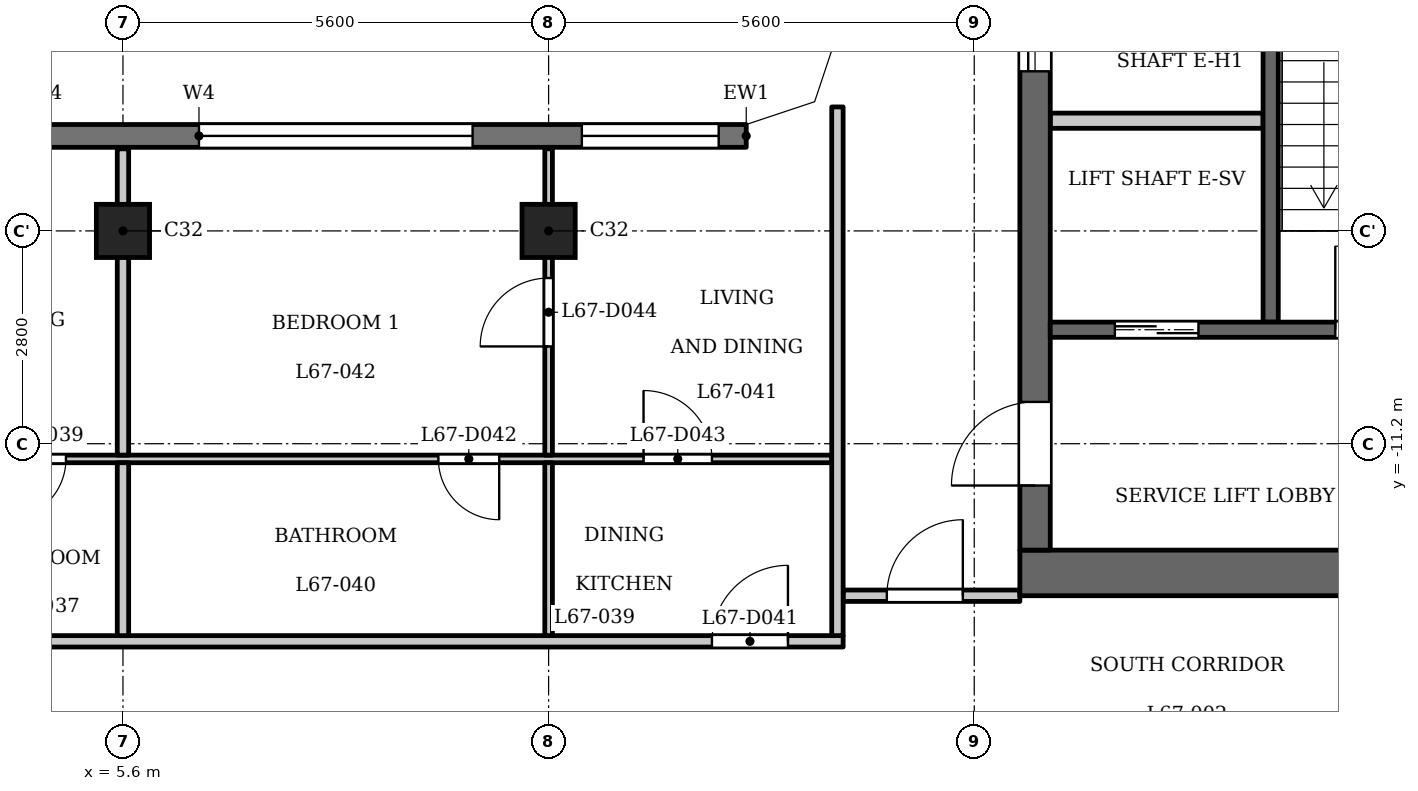
"""IFC4 building model, lengths in metres.
Left out: names, types, materials, properties, quantities, classifications, styles, units other than length and angle.
Written with IfcOpenShell. Run it as: python <this file> out.ifc"""

import sys

from ifc_helpers import new_model, si_unit, direction, frame, frame_2d, origin, origin_2d, place, context, subcontext, project, spatial, polyline, rectangle, outline, extrude, element, fill, save


model = new_model("IFC4")
c1 = context("Model", 3, precision=1e-05, world=origin(), true_north=direction((0.0, 1.0)))
c2 = subcontext(c1, "Body", "Model", "MODEL_VIEW")
j1 = project(units=[si_unit("LENGTHUNIT", "METRE"), si_unit("PLANEANGLEUNIT", "RADIAN")], contexts=[c1])
p1 = place(None, origin())
s1 = spatial("IfcSite", under=j1, at=p1, CompositionType="ELEMENT")
p2 = place(p1, origin())
s2 = spatial("IfcBuilding", under=s1, at=p2, CompositionType="ELEMENT")
p3 = place(p2, frame((0.0, 0.0, 259.2)))
s3 = spatial("IfcBuildingStorey", under=s2, at=p3, CompositionType="ELEMENT", Elevation=259.2)
for number, where, z_axis, x_axis in (
    (1, (5.6, -8.4, 0.0), (0.0, 0.0, 1.0), (1.0, 0.0, 0.0)),
    (2, (11.2, -8.4, 0.0), (0.0, 0.0, 1.0), (1.0, 0.0, 0.0)),
):
    element("IfcColumn", number, at=place(p3, frame(where, z_axis=z_axis, x_axis=x_axis)), inside=s3, PredefinedType="COLUMN", context=c2, shape_type="SweptSolid", body=[
        extrude(rectangle(XDim=0.7, YDim=0.7, at=origin_2d()), origin(), (0.0, 0.0, 1.0), 3.5),
    ])
p4 = place(p3, frame((13.8, -7.15, 0.0), z_axis=(0.0, 0.0, 1.0), x_axis=(-1.0, 0.0, 0.0)))
e3 = element("IfcWall", 3, at=p4, inside=s3, PredefinedType="SOLIDWALL", context=c2, shape_type="SweptSolid", body=[
    extrude(rectangle(XDim=27.6, YDim=0.3, at=frame_2d((13.8, 0.0))), origin(), (0.0, 0.0, 1.0), 3.2),
])
p5 = place(p4, frame((0.363, 0.0, 0.9)))
e4 = element("IfcOpeningElement", 4, at=p5, cuts=e3, PredefinedType="OPENING", context=c2, shape_type="SweptSolid", body=[
    extrude(rectangle(XDim=1.8, YDim=1.25, at=frame_2d((0.9, 0.625))), frame((0.0, 0.16, 0.0), z_axis=(0.0, -1.0, 0.0), x_axis=(1.0, 0.0, 0.0)), (0.0, 0.0, 1.0), 0.32),
])
p6 = place(p4, frame((3.6, 0.0, 1.2)))
e5 = element("IfcOpeningElement", 5, at=p6, cuts=e3, PredefinedType="OPENING", context=c2, shape_type="SweptSolid", body=[
    extrude(rectangle(XDim=3.6, YDim=0.95, at=frame_2d((1.8, 0.475))), frame((0.0, 0.16, 0.0), z_axis=(0.0, -1.0, 0.0), x_axis=(1.0, 0.0, 0.0)), (0.0, 0.0, 1.0), 0.32),
])
p7 = place(p4, frame((9.2, 0.0, 1.2)))
e6 = element("IfcOpeningElement", 6, at=p7, cuts=e3, PredefinedType="OPENING", context=c2, shape_type="SweptSolid", body=[
    extrude(rectangle(XDim=3.6, YDim=0.95, at=frame_2d((1.8, 0.475))), frame((0.0, 0.16, 0.0), z_axis=(0.0, -1.0, 0.0), x_axis=(1.0, 0.0, 0.0)), (0.0, 0.0, 1.0), 0.32),
])
p8 = place(p4, frame((14.8, 0.0, 1.2)))
e7 = element("IfcOpeningElement", 7, at=p8, cuts=e3, PredefinedType="OPENING", context=c2, shape_type="SweptSolid", body=[
    extrude(rectangle(XDim=3.6, YDim=0.95, at=frame_2d((1.8, 0.475))), frame((0.0, 0.16, 0.0), z_axis=(0.0, -1.0, 0.0), x_axis=(1.0, 0.0, 0.0)), (0.0, 0.0, 1.0), 0.32),
])
p9 = place(p4, frame((20.4, 0.0, 1.2)))
e8 = element("IfcOpeningElement", 8, at=p9, cuts=e3, PredefinedType="OPENING", context=c2, shape_type="SweptSolid", body=[
    extrude(rectangle(XDim=3.6, YDim=0.95, at=frame_2d((1.8, 0.475))), frame((0.0, 0.16, 0.0), z_axis=(0.0, -1.0, 0.0), x_axis=(1.0, 0.0, 0.0)), (0.0, 0.0, 1.0), 0.32),
])
p10 = place(p4, frame((25.438, 0.0, 0.9)))
e9 = element("IfcOpeningElement", 9, at=p10, cuts=e3, PredefinedType="OPENING", context=c2, shape_type="SweptSolid", body=[
    extrude(rectangle(XDim=1.8, YDim=1.25, at=frame_2d((0.9, 0.625))), frame((0.0, 0.16, 0.0), z_axis=(0.0, -1.0, 0.0), x_axis=(1.0, 0.0, 0.0)), (0.0, 0.0, 1.0), 0.32),
])
p11 = place(p3, frame((20.7, -9.6, 0.0), z_axis=(0.0, 0.0, 1.0), x_axis=(0.0, 1.0, 0.0)))
e10 = element("IfcWall", 10, at=p11, inside=s3, PredefinedType="SHEAR", context=c2, shape_type="SweptSolid", body=[
    extrude(rectangle(XDim=7.35, YDim=0.2, at=frame_2d((3.675, 0.0))), origin(), (0.0, 0.0, 1.0), 3.2),
])
p12 = place(p3, frame((17.4, -12.9, 0.0), z_axis=(0.0, 0.0, 1.0), x_axis=(1.0, 0.0, 0.0)))
e11 = element("IfcWall", 11, at=p12, inside=s3, PredefinedType="SHEAR", context=c2, shape_type="SweptSolid", body=[
    extrude(rectangle(XDim=7.32, YDim=0.6, at=frame_2d((3.66, 0.0))), origin(), (0.0, 0.0, 1.0), 3.2),
])
p13 = place(p3, frame((17.6, -12.6, 0.0), z_axis=(0.0, 0.0, 1.0), x_axis=(0.0, 1.0, 0.0)))
e12 = element("IfcWall", 12, at=p13, inside=s3, PredefinedType="SHEAR", context=c2, shape_type="SweptSolid", body=[
    extrude(rectangle(XDim=25.2, YDim=0.4, at=frame_2d((12.6, 0.0))), origin(), (0.0, 0.0, 1.0), 3.2),
])
p14 = place(p13, frame((6.3, 0.0, 0.0)))
e13 = element("IfcOpeningElement", 13, at=p14, cuts=e12, PredefinedType="OPENING", context=c2, shape_type="SweptSolid", body=[
    extrude(rectangle(XDim=1.1, YDim=2.1, at=frame_2d((0.55, 1.05))), frame((0.0, 0.21, 0.0), z_axis=(0.0, -1.0, 0.0), x_axis=(1.0, 0.0, 0.0)), (0.0, 0.0, 1.0), 0.42),
])
p15 = place(p13, frame((8.7, 0.0, 0.0)))
e14 = element("IfcOpeningElement", 14, at=p15, cuts=e12, PredefinedType="OPENING", context=c2, shape_type="SweptSolid", body=[
    extrude(rectangle(XDim=1.1, YDim=2.1, at=frame_2d((0.55, 1.05))), frame((0.0, 0.21, 0.0), z_axis=(0.0, -1.0, 0.0), x_axis=(1.0, 0.0, 0.0)), (0.0, 0.0, 1.0), 0.42),
])
p16 = place(p13, frame((11.2, 0.0, 0.0)))
e15 = element("IfcOpeningElement", 15, at=p16, cuts=e12, PredefinedType="OPENING", context=c2, shape_type="SweptSolid", body=[
    extrude(rectangle(XDim=0.9, YDim=2.1, at=frame_2d((0.45, 1.05))), frame((0.0, 0.21, 0.0), z_axis=(0.0, -1.0, 0.0), x_axis=(1.0, 0.0, 0.0)), (0.0, 0.0, 1.0), 0.42),
])
p17 = place(p13, frame((17.05, 0.0, 0.0)))
e16 = element("IfcOpeningElement", 16, at=p17, cuts=e12, PredefinedType="OPENING", context=c2, shape_type="SweptSolid", body=[
    extrude(rectangle(XDim=0.9, YDim=2.1, at=frame_2d((0.45, 1.05))), frame((0.0, 0.21, 0.0), z_axis=(0.0, -1.0, 0.0), x_axis=(1.0, 0.0, 0.0)), (0.0, 0.0, 1.0), 0.42),
])
p18 = place(p13, frame((23.25, 0.0, 0.0)))
e17 = element("IfcOpeningElement", 17, at=p18, cuts=e12, PredefinedType="OPENING", context=c2, shape_type="SweptSolid", body=[
    extrude(rectangle(XDim=1.1, YDim=2.1, at=frame_2d((0.55, 1.05))), frame((0.0, 0.21, 0.0), z_axis=(0.0, -1.0, 0.0), x_axis=(1.0, 0.0, 0.0)), (0.0, 0.0, 1.0), 0.42),
])
p19 = place(p13, frame((0.85, 0.0, 0.0)))
e18 = element("IfcOpeningElement", 18, at=p19, cuts=e12, PredefinedType="OPENING", context=c2, shape_type="SweptSolid", body=[
    extrude(rectangle(XDim=1.1, YDim=2.1, at=frame_2d((0.55, 1.05))), frame((0.0, 0.21, 0.0), z_axis=(0.0, -1.0, 0.0), x_axis=(1.0, 0.0, 0.0)), (0.0, 0.0, 1.0), 0.42),
])
p20 = place(p13, frame((13.075, 0.0, 0.0)))
e19 = element("IfcOpeningElement", 19, at=p20, cuts=e12, PredefinedType="OPENING", context=c2, shape_type="SweptSolid", body=[
    extrude(rectangle(XDim=1.8, YDim=2.1, at=frame_2d((0.9, 1.05))), frame((0.0, 0.21, 0.0), z_axis=(0.0, -1.0, 0.0), x_axis=(1.0, 0.0, 0.0)), (0.0, 0.0, 1.0), 0.42),
])
p21 = place(p3, frame((17.8, -9.7, 0.0), z_axis=(0.0, 0.0, 1.0), x_axis=(1.0, 0.0, 0.0)))
e20 = element("IfcWall", 20, at=p21, inside=s3, PredefinedType="SHEAR", context=c2, shape_type="SweptSolid", body=[
    extrude(rectangle(XDim=5.8, YDim=0.2, at=frame_2d((2.9, 0.0))), origin(), (0.0, 0.0, 1.0), 3.2),
])
p22 = place(p21, frame((0.85, 0.0, 0.0)))
e21 = element("IfcOpeningElement", 21, at=p22, cuts=e20, PredefinedType="OPENING", context=c2, shape_type="SweptSolid", body=[
    extrude(rectangle(XDim=1.1, YDim=2.1, at=frame_2d((0.55, 1.05))), frame((0.0, 0.11, 0.0), z_axis=(0.0, -1.0, 0.0), x_axis=(1.0, 0.0, 0.0)), (0.0, 0.0, 1.0), 0.22),
])
p23 = place(p21, frame((3.75, 0.0, 0.0)))
e22 = element("IfcOpeningElement", 22, at=p23, cuts=e20, PredefinedType="OPENING", context=c2, shape_type="SweptSolid", body=[
    extrude(rectangle(XDim=1.1, YDim=2.1, at=frame_2d((0.55, 1.05))), frame((0.0, 0.11, 0.0), z_axis=(0.0, -1.0, 0.0), x_axis=(1.0, 0.0, 0.0)), (0.0, 0.0, 1.0), 0.22),
])
p24 = place(p3, frame((17.8, -6.95, 0.0), z_axis=(0.0, 0.0, 1.0), x_axis=(1.0, 0.0, 0.0)))
e23 = element("IfcWall", 23, at=p24, inside=s3, PredefinedType="PARTITIONING", context=c2, shape_type="SweptSolid", body=[
    extrude(rectangle(XDim=2.8, YDim=0.2, at=frame_2d((1.4, 0.0))), origin(), (0.0, 0.0, 1.0), 3.2),
])
p25 = place(p3, frame((-15.075, -13.8, 0.0), z_axis=(0.0, 0.0, 1.0), x_axis=(1.0, 0.0, 0.0)))
e24 = element("IfcWall", 24, at=p25, inside=s3, PredefinedType="PARTITIONING", context=c2, shape_type="SweptSolid", body=[
    extrude(rectangle(XDim=30.15, YDim=0.15, at=frame_2d((15.075, 0.0))), origin(), (0.0, 0.0, 1.0), 3.2),
])
p26 = place(p25, frame((7.825, 0.0, 0.0)))
e25 = element("IfcOpeningElement", 25, at=p26, cuts=e24, PredefinedType="OPENING", context=c2, shape_type="SweptSolid", body=[
    extrude(rectangle(XDim=1.0, YDim=2.1, at=frame_2d((0.5, 1.05))), frame((0.0, 0.085, 0.0), z_axis=(0.0, -1.0, 0.0), x_axis=(1.0, 0.0, 0.0)), (0.0, 0.0, 1.0), 0.17),
])
p27 = place(p25, frame((11.225, 0.0, 0.0)))
e26 = element("IfcOpeningElement", 26, at=p27, cuts=e24, PredefinedType="OPENING", context=c2, shape_type="SweptSolid", body=[
    extrude(rectangle(XDim=1.0, YDim=2.1, at=frame_2d((0.5, 1.05))), frame((0.0, 0.085, 0.0), z_axis=(0.0, -1.0, 0.0), x_axis=(1.0, 0.0, 0.0)), (0.0, 0.0, 1.0), 0.17),
])
p28 = place(p25, frame((15.575, 0.0, 0.0)))
e27 = element("IfcOpeningElement", 27, at=p28, cuts=e24, PredefinedType="OPENING", context=c2, shape_type="SweptSolid", body=[
    extrude(rectangle(XDim=1.0, YDim=2.1, at=frame_2d((0.5, 1.05))), frame((0.0, 0.085, 0.0), z_axis=(0.0, -1.0, 0.0), x_axis=(1.0, 0.0, 0.0)), (0.0, 0.0, 1.0), 0.17),
])
p29 = place(p25, frame((28.424, 0.0, 0.0)))
e28 = element("IfcOpeningElement", 28, at=p29, cuts=e24, PredefinedType="OPENING", context=c2, shape_type="SweptSolid", body=[
    extrude(rectangle(XDim=1.0, YDim=2.1, at=frame_2d((0.5, 1.05))), frame((0.0, 0.085, 0.0), z_axis=(0.0, -1.0, 0.0), x_axis=(1.0, 0.0, 0.0)), (0.0, 0.0, 1.0), 0.17),
])
p30 = place(p3, frame((15.075, -13.2, 0.0), z_axis=(0.0, 0.0, 1.0), x_axis=(1.0, 0.0, 0.0)))
e29 = element("IfcWall", 29, at=p30, inside=s3, PredefinedType="PARTITIONING", context=c2, shape_type="SweptSolid", body=[
    extrude(rectangle(XDim=2.325, YDim=0.15, at=frame_2d((1.163, 0.0))), origin(), (0.0, 0.0, 1.0), 3.2),
])
p31 = place(p30, frame((0.575, 0.0, 0.0)))
e30 = element("IfcOpeningElement", 30, at=p31, cuts=e29, PredefinedType="OPENING", context=c2, shape_type="SweptSolid", body=[
    extrude(rectangle(XDim=1.0, YDim=2.1, at=frame_2d((0.5, 1.05))), frame((0.0, 0.085, 0.0), z_axis=(0.0, -1.0, 0.0), x_axis=(1.0, 0.0, 0.0)), (0.0, 0.0, 1.0), 0.17),
])
p32 = place(p3, frame((-14.925, -11.4, 0.0), z_axis=(0.0, 0.0, 1.0), x_axis=(1.0, 0.0, 0.0)))
e31 = element("IfcWall", 31, at=p32, inside=s3, PredefinedType="PARTITIONING", context=c2, shape_type="SweptSolid", body=[
    extrude(rectangle(XDim=29.85, YDim=0.1, at=frame_2d((14.925, 0.0))), origin(), (0.0, 0.0, 1.0), 3.2),
])
p33 = place(p32, frame((2.326, 0.0, 0.0)))
e32 = element("IfcOpeningElement", 32, at=p33, cuts=e31, PredefinedType="OPENING", context=c2, shape_type="SweptSolid", body=[
    extrude(rectangle(XDim=0.8, YDim=2.1, at=frame_2d((0.4, 1.05))), frame((0.0, 0.06, 0.0), z_axis=(0.0, -1.0, 0.0), x_axis=(1.0, 0.0, 0.0)), (0.0, 0.0, 1.0), 0.12),
])
p34 = place(p32, frame((6.775, 0.0, 0.0)))
e33 = element("IfcOpeningElement", 33, at=p34, cuts=e31, PredefinedType="OPENING", context=c2, shape_type="SweptSolid", body=[
    extrude(rectangle(XDim=0.9, YDim=2.1, at=frame_2d((0.45, 1.05))), frame((0.0, 0.06, 0.0), z_axis=(0.0, -1.0, 0.0), x_axis=(1.0, 0.0, 0.0)), (0.0, 0.0, 1.0), 0.12),
])
p35 = place(p32, frame((13.375, 0.0, 0.0)))
e34 = element("IfcOpeningElement", 34, at=p35, cuts=e31, PredefinedType="OPENING", context=c2, shape_type="SweptSolid", body=[
    extrude(rectangle(XDim=0.8, YDim=2.1, at=frame_2d((0.4, 1.05))), frame((0.0, 0.06, 0.0), z_axis=(0.0, -1.0, 0.0), x_axis=(1.0, 0.0, 0.0)), (0.0, 0.0, 1.0), 0.12),
])
p36 = place(p32, frame((10.175, 0.0, 0.0)))
e35 = element("IfcOpeningElement", 35, at=p36, cuts=e31, PredefinedType="OPENING", context=c2, shape_type="SweptSolid", body=[
    extrude(rectangle(XDim=0.9, YDim=2.1, at=frame_2d((0.45, 1.05))), frame((0.0, 0.06, 0.0), z_axis=(0.0, -1.0, 0.0), x_axis=(1.0, 0.0, 0.0)), (0.0, 0.0, 1.0), 0.12),
])
p37 = place(p32, frame((18.975, 0.0, 0.0)))
e36 = element("IfcOpeningElement", 36, at=p37, cuts=e31, PredefinedType="OPENING", context=c2, shape_type="SweptSolid", body=[
    extrude(rectangle(XDim=0.8, YDim=2.1, at=frame_2d((0.4, 1.05))), frame((0.0, 0.06, 0.0), z_axis=(0.0, -1.0, 0.0), x_axis=(1.0, 0.0, 0.0)), (0.0, 0.0, 1.0), 0.12),
])
p38 = place(p32, frame((16.525, 0.0, 0.0)))
e37 = element("IfcOpeningElement", 37, at=p38, cuts=e31, PredefinedType="OPENING", context=c2, shape_type="SweptSolid", body=[
    extrude(rectangle(XDim=0.9, YDim=2.1, at=frame_2d((0.45, 1.05))), frame((0.0, 0.06, 0.0), z_axis=(0.0, -1.0, 0.0), x_axis=(1.0, 0.0, 0.0)), (0.0, 0.0, 1.0), 0.12),
])
p39 = place(p32, frame((24.675, 0.0, 0.0)))
e38 = element("IfcOpeningElement", 38, at=p39, cuts=e31, PredefinedType="OPENING", context=c2, shape_type="SweptSolid", body=[
    extrude(rectangle(XDim=0.8, YDim=2.1, at=frame_2d((0.4, 1.05))), frame((0.0, 0.06, 0.0), z_axis=(0.0, -1.0, 0.0), x_axis=(1.0, 0.0, 0.0)), (0.0, 0.0, 1.0), 0.12),
])
p40 = place(p32, frame((27.374, 0.0, 0.0)))
e39 = element("IfcOpeningElement", 39, at=p40, cuts=e31, PredefinedType="OPENING", context=c2, shape_type="SweptSolid", body=[
    extrude(rectangle(XDim=0.9, YDim=2.1, at=frame_2d((0.45, 1.05))), frame((0.0, 0.06, 0.0), z_axis=(0.0, -1.0, 0.0), x_axis=(1.0, 0.0, 0.0)), (0.0, 0.0, 1.0), 0.12),
])
p41 = place(p3, frame((5.6, -13.725, 0.0), z_axis=(0.0, 0.0, 1.0), x_axis=(0.0, 1.0, 0.0)))
e40 = element("IfcWall", 40, at=p41, inside=s3, PredefinedType="PARTITIONING", context=c2, shape_type="SweptSolid", body=[
    extrude(rectangle(XDim=2.275, YDim=0.15, at=frame_2d((1.138, 0.0))), origin(), (0.0, 0.0, 1.0), 3.2),
])
p42 = place(p3, frame((5.6, -11.35, 0.0), z_axis=(0.0, 0.0, 1.0), x_axis=(0.0, 1.0, 0.0)))
e41 = element("IfcWall", 41, at=p42, inside=s3, PredefinedType="PARTITIONING", context=c2, shape_type="SweptSolid", body=[
    extrude(rectangle(XDim=4.03, YDim=0.15, at=frame_2d((2.015, 0.0))), origin(), (0.0, 0.0, 1.0), 3.2),
])
p43 = place(p3, frame((11.2, -13.725, 0.0), z_axis=(0.0, 0.0, 1.0), x_axis=(0.0, 1.0, 0.0)))
e42 = element("IfcWall", 42, at=p43, inside=s3, PredefinedType="PARTITIONING", context=c2, shape_type="SweptSolid", body=[
    extrude(rectangle(XDim=2.275, YDim=0.1, at=frame_2d((1.138, 0.0))), origin(), (0.0, 0.0, 1.0), 3.2),
])
p44 = place(p3, frame((11.2, -11.35, 0.0), z_axis=(0.0, 0.0, 1.0), x_axis=(0.0, 1.0, 0.0)))
e43 = element("IfcWall", 43, at=p44, inside=s3, PredefinedType="PARTITIONING", context=c2, shape_type="SweptSolid", body=[
    extrude(rectangle(XDim=4.03, YDim=0.1, at=frame_2d((2.015, 0.0))), origin(), (0.0, 0.0, 1.0), 3.2),
])
p45 = place(p44, frame((1.43, 0.0, 0.0)))
e44 = element("IfcOpeningElement", 44, at=p45, cuts=e43, PredefinedType="OPENING", context=c2, shape_type="SweptSolid", body=[
    extrude(rectangle(XDim=0.9, YDim=2.1, at=frame_2d((0.45, 1.05))), frame((0.0, 0.06, 0.0), z_axis=(0.0, -1.0, 0.0), x_axis=(1.0, 0.0, 0.0)), (0.0, 0.0, 1.0), 0.12),
])
p46 = place(p3, frame((15.0, -13.725, 0.0), z_axis=(0.0, 0.0, 1.0), x_axis=(0.0, 1.0, 0.0)))
e45 = element("IfcWall", 45, at=p46, inside=s3, PredefinedType="PARTITIONING", context=c2, shape_type="SweptSolid", body=[
    extrude(rectangle(XDim=6.956, YDim=0.15, at=frame_2d((3.478, 0.0))), origin(), (0.0, 0.0, 1.0), 3.2),
])
p47 = place(p3, origin())
e46 = element("IfcWall", 46, at=p47, inside=s3, PredefinedType="SOLIDWALL", context=c2, shape_type="SweptSolid", body=[
    extrude(outline(polyline([(14.937, -6.937), (15.3, -5.849), (15.3, -5.8), (15.0, -5.8), (14.7, -6.7), (13.8, -7.0), (13.8, -7.3), (13.849, -7.3), (14.937, -6.937)])), origin(), (0.0, 0.0, 1.0), 3.2),
])
p48 = place(p22, origin())
e47 = element("IfcDoor", 47, at=p48, inside=s3, OperationType="DOUBLE_DOOR_SLIDING", PredefinedType="DOOR", context=c2, shape_type="SweptSolid", body=[
    extrude(rectangle(XDim=1.1, YDim=2.1, at=frame_2d((0.55, 1.05))), frame((0.0, 0.025, 0.0), z_axis=(0.0, -1.0, 0.0), x_axis=(1.0, 0.0, 0.0)), (0.0, 0.0, 1.0), 0.05),
])
fill(e21, e47)
p49 = place(p14, origin())
e48 = element("IfcDoor", 48, at=p49, inside=s3, OperationType="DOUBLE_DOOR_SLIDING", PredefinedType="DOOR", context=c2, shape_type="SweptSolid", body=[
    extrude(rectangle(XDim=1.1, YDim=2.1, at=frame_2d((0.55, 1.05))), frame((0.0, 0.025, 0.0), z_axis=(0.0, -1.0, 0.0), x_axis=(1.0, 0.0, 0.0)), (0.0, 0.0, 1.0), 0.05),
])
fill(e13, e48)
p50 = place(p19, origin())
e49 = element("IfcDoor", 49, at=p50, inside=s3, OperationType="SINGLE_SWING_RIGHT", PredefinedType="DOOR", context=c2, shape_type="SweptSolid", body=[
    extrude(rectangle(XDim=1.1, YDim=2.1, at=frame_2d((0.55, 1.05))), frame((0.0, 0.025, 0.0), z_axis=(0.0, -1.0, 0.0), x_axis=(1.0, 0.0, 0.0)), (0.0, 0.0, 1.0), 0.05),
])
fill(e18, e49)
p51 = place(p23, origin())
e50 = element("IfcDoor", 50, at=p51, inside=s3, OperationType="SINGLE_SWING_RIGHT", PredefinedType="DOOR", context=c2, shape_type="SweptSolid", body=[
    extrude(rectangle(XDim=1.1, YDim=2.1, at=frame_2d((0.55, 1.05))), frame((0.0, 0.025, 0.0), z_axis=(0.0, -1.0, 0.0), x_axis=(1.0, 0.0, 0.0)), (0.0, 0.0, 1.0), 0.05),
])
fill(e22, e50)
p52 = place(p31, origin())
e51 = element("IfcDoor", 51, at=p52, inside=s3, OperationType="SINGLE_SWING_LEFT", PredefinedType="DOOR", context=c2, shape_type="SweptSolid", body=[
    extrude(rectangle(XDim=1.0, YDim=2.1, at=frame_2d((0.5, 1.05))), frame((0.0, 0.025, 0.0), z_axis=(0.0, -1.0, 0.0), x_axis=(1.0, 0.0, 0.0)), (0.0, 0.0, 1.0), 0.05),
])
fill(e30, e51)
p53 = place(p37, origin())
e52 = element("IfcDoor", 52, at=p53, inside=s3, OperationType="SINGLE_SWING_LEFT", PredefinedType="DOOR", context=c2, shape_type="SweptSolid", body=[
    extrude(rectangle(XDim=0.8, YDim=2.1, at=frame_2d((0.4, 1.05))), frame((0.0, 0.025, 0.0), z_axis=(0.0, -1.0, 0.0), x_axis=(1.0, 0.0, 0.0)), (0.0, 0.0, 1.0), 0.05),
])
fill(e36, e52)
p54 = place(p29, origin())
e53 = element("IfcDoor", 53, at=p54, inside=s3, OperationType="SINGLE_SWING_LEFT", PredefinedType="DOOR", context=c2, shape_type="SweptSolid", body=[
    extrude(rectangle(XDim=1.0, YDim=2.1, at=frame_2d((0.5, 1.05))), frame((0.0, 0.025, 0.0), z_axis=(0.0, -1.0, 0.0), x_axis=(1.0, 0.0, 0.0)), (0.0, 0.0, 1.0), 0.05),
])
fill(e28, e53)
p55 = place(p39, origin())
e54 = element("IfcDoor", 54, at=p55, inside=s3, OperationType="SINGLE_SWING_RIGHT", PredefinedType="DOOR", context=c2, shape_type="SweptSolid", body=[
    extrude(rectangle(XDim=0.8, YDim=2.1, at=frame_2d((0.4, 1.05))), frame((0.0, 0.025, 0.0), z_axis=(0.0, -1.0, 0.0), x_axis=(1.0, 0.0, 0.0)), (0.0, 0.0, 1.0), 0.05),
])
fill(e38, e54)
p56 = place(p40, origin())
e55 = element("IfcDoor", 55, at=p56, inside=s3, OperationType="SINGLE_SWING_RIGHT", PredefinedType="DOOR", context=c2, shape_type="SweptSolid", body=[
    extrude(rectangle(XDim=0.9, YDim=2.1, at=frame_2d((0.45, 1.05))), frame((0.0, 0.025, 0.0), z_axis=(0.0, -1.0, 0.0), x_axis=(1.0, 0.0, 0.0)), (0.0, 0.0, 1.0), 0.05),
])
fill(e39, e55)
p57 = place(p45, origin())
e56 = element("IfcDoor", 56, at=p57, inside=s3, OperationType="SINGLE_SWING_RIGHT", PredefinedType="DOOR", context=c2, shape_type="SweptSolid", body=[
    extrude(rectangle(XDim=0.9, YDim=2.1, at=frame_2d((0.45, 1.05))), frame((0.0, 0.025, 0.0), z_axis=(0.0, -1.0, 0.0), x_axis=(1.0, 0.0, 0.0)), (0.0, 0.0, 1.0), 0.05),
])
fill(e44, e56)
p58 = place(p5, origin())
e57 = element("IfcWindow", 57, at=p58, inside=s3, PartitioningType="SINGLE_PANEL", PredefinedType="WINDOW", context=c2, shape_type="SweptSolid", body=[
    extrude(rectangle(XDim=1.8, YDim=1.25, at=frame_2d((0.9, 0.625))), frame((0.0, 0.03, 0.0), z_axis=(0.0, -1.0, 0.0), x_axis=(1.0, 0.0, 0.0)), (0.0, 0.0, 1.0), 0.06),
])
fill(e4, e57)
p59 = place(p6, origin())
e58 = element("IfcWindow", 58, at=p59, inside=s3, PartitioningType="SINGLE_PANEL", PredefinedType="WINDOW", context=c2, shape_type="SweptSolid", body=[
    extrude(rectangle(XDim=3.6, YDim=0.95, at=frame_2d((1.8, 0.475))), frame((0.0, 0.03, 0.0), z_axis=(0.0, -1.0, 0.0), x_axis=(1.0, 0.0, 0.0)), (0.0, 0.0, 1.0), 0.06),
])
fill(e5, e58)
save(model, sys.argv[1])
